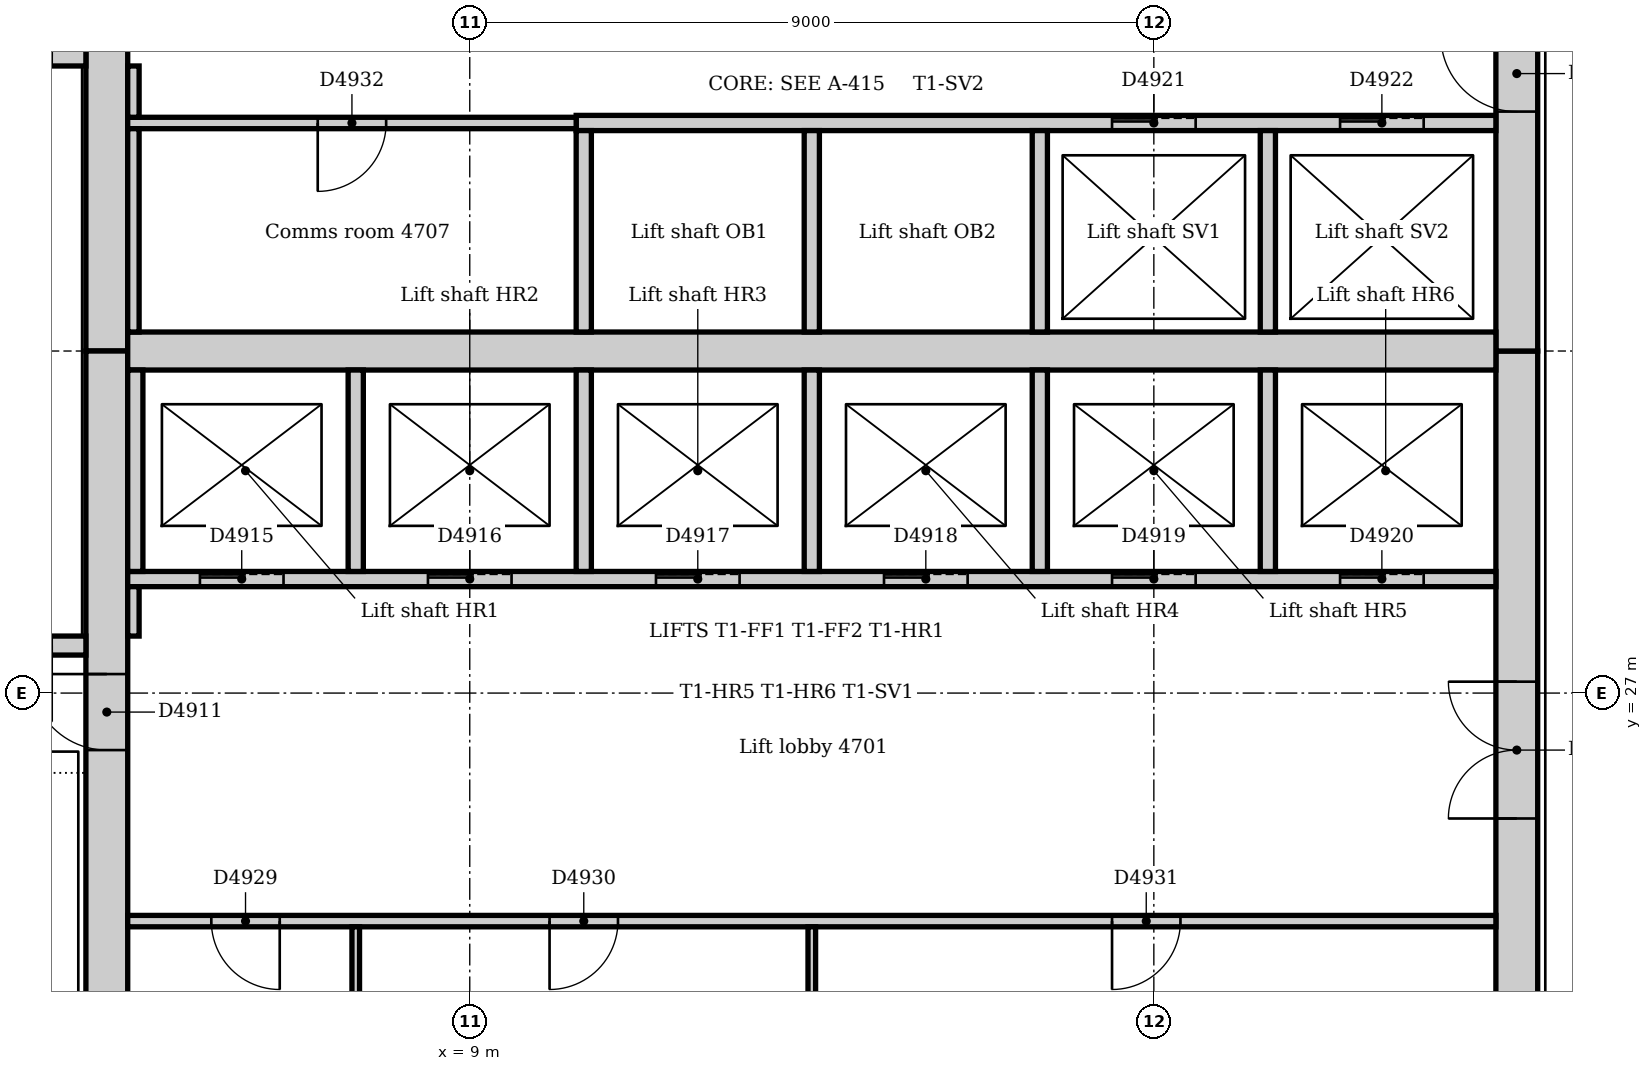
"""IFC4 building model, lengths in metres.
Left out: names, types, materials, properties, quantities, classifications, styles, units other than length and angle.
Written with IfcOpenShell. Run it as: python <this file> out.ifc"""

import sys

from ifc_helpers import new_model, si_unit, direction, frame, frame_2d, origin, place, context, subcontext, project, spatial, rectangle, extrude, element, fill, save


model = new_model("IFC4")
c1 = context("Model", 3, precision=1e-05, world=origin(), true_north=direction((0.0, 1.0)))
c2 = subcontext(c1, "Body", "Model", "MODEL_VIEW")
j1 = project(units=[si_unit("LENGTHUNIT", "METRE"), si_unit("PLANEANGLEUNIT", "RADIAN")], contexts=[c1])
p1 = place(None, origin())
s1 = spatial("IfcSite", under=j1, at=p1, CompositionType="ELEMENT")
p2 = place(p1, origin())
s2 = spatial("IfcBuilding", under=s1, at=p2, CompositionType="ELEMENT")
p3 = place(p2, frame((0.0, 0.0, 198.0)))
s3 = spatial("IfcBuildingStorey", under=s2, at=p3, CompositionType="ELEMENT", Elevation=198.0)
p4 = place(p3, frame((22.775, 21.0, 0.0), z_axis=(0.0, 0.0, 1.0), x_axis=(0.0, 1.0, 0.0)))
e1 = element("IfcWall", 1, at=p4, inside=s3, PredefinedType="SOLIDWALL", context=c2, shape_type="SweptSolid", body=[
    extrude(rectangle(XDim=10.5, YDim=0.55, at=frame_2d((5.25, 0.0))), origin(), (0.0, 0.0, 1.0), 4.0),
])
p5 = place(p4, frame((4.35, 0.0, 0.0)))
e2 = element("IfcOpeningElement", 2, at=p5, cuts=e1, PredefinedType="OPENING", context=c2, shape_type="SweptSolid", body=[
    extrude(rectangle(XDim=1.8, YDim=2.1, at=frame_2d((0.9, 1.05))), frame((0.0, 0.285, 0.0), z_axis=(0.0, -1.0, 0.0), x_axis=(1.0, 0.0, 0.0)), (0.0, 0.0, 1.0), 0.57),
])
p6 = place(p3, frame((22.775, 31.5, 0.0), z_axis=(0.0, 0.0, 1.0), x_axis=(0.0, 1.0, 0.0)))
e3 = element("IfcWall", 3, at=p6, inside=s3, PredefinedType="SOLIDWALL", context=c2, shape_type="SweptSolid", body=[
    extrude(rectangle(XDim=10.5, YDim=0.55, at=frame_2d((5.25, 0.0))), origin(), (0.0, 0.0, 1.0), 4.0),
])
p7 = place(p6, frame((3.15, 0.0, 0.0)))
e4 = element("IfcOpeningElement", 4, at=p7, cuts=e3, PredefinedType="OPENING", context=c2, shape_type="SweptSolid", body=[
    extrude(rectangle(XDim=1.0, YDim=2.1, at=frame_2d((0.5, 1.05))), frame((0.0, 0.285, 0.0), z_axis=(0.0, -1.0, 0.0), x_axis=(1.0, 0.0, 0.0)), (0.0, 0.0, 1.0), 0.57),
])
p8 = place(p6, frame((5.2, 0.0, 0.0)))
e5 = element("IfcOpeningElement", 5, at=p8, cuts=e3, PredefinedType="OPENING", context=c2, shape_type="SweptSolid", body=[
    extrude(rectangle(XDim=1.0, YDim=2.1, at=frame_2d((0.5, 1.05))), frame((0.0, 0.285, 0.0), z_axis=(0.0, -1.0, 0.0), x_axis=(1.0, 0.0, 0.0)), (0.0, 0.0, 1.0), 0.57),
])
p9 = place(p3, frame((4.225, 42.0, 0.0), z_axis=(0.0, 0.0, 1.0), x_axis=(0.0, -1.0, 0.0)))
e6 = element("IfcWall", 6, at=p9, inside=s3, PredefinedType="SOLIDWALL", context=c2, shape_type="SweptSolid", body=[
    extrude(rectangle(XDim=10.5, YDim=0.55, at=frame_2d((5.25, 0.0))), origin(), (0.0, 0.0, 1.0), 4.0),
])
p10 = place(p9, frame((5.3, 0.0, 0.0)))
e7 = element("IfcOpeningElement", 7, at=p10, cuts=e6, PredefinedType="OPENING", context=c2, shape_type="SweptSolid", body=[
    extrude(rectangle(XDim=1.0, YDim=2.1, at=frame_2d((0.5, 1.05))), frame((0.0, 0.285, 0.0), z_axis=(0.0, -1.0, 0.0), x_axis=(1.0, 0.0, 0.0)), (0.0, 0.0, 1.0), 0.57),
])
p11 = place(p3, frame((4.225, 31.5, 0.0), z_axis=(0.0, 0.0, 1.0), x_axis=(0.0, -1.0, 0.0)))
e8 = element("IfcWall", 8, at=p11, inside=s3, PredefinedType="SOLIDWALL", context=c2, shape_type="SweptSolid", body=[
    extrude(rectangle(XDim=10.5, YDim=0.55, at=frame_2d((5.25, 0.0))), origin(), (0.0, 0.0, 1.0), 4.0),
])
p12 = place(p11, frame((4.25, 0.0, 0.0)))
e9 = element("IfcOpeningElement", 9, at=p12, cuts=e8, PredefinedType="OPENING", context=c2, shape_type="SweptSolid", body=[
    extrude(rectangle(XDim=1.0, YDim=2.1, at=frame_2d((0.5, 1.05))), frame((0.0, 0.285, 0.0), z_axis=(0.0, -1.0, 0.0), x_axis=(1.0, 0.0, 0.0)), (0.0, 0.0, 1.0), 0.57),
])
p13 = place(p3, frame((4.5, 31.5, 0.0), z_axis=(0.0, 0.0, 1.0), x_axis=(1.0, 0.0, 0.0)))
e10 = element("IfcWall", 10, at=p13, inside=s3, PredefinedType="SOLIDWALL", context=c2, shape_type="SweptSolid", body=[
    extrude(rectangle(XDim=18.0, YDim=0.5, at=frame_2d((9.0, 0.0))), origin(), (0.0, 0.0, 1.0), 4.0),
])
p14 = place(p3, frame((3.95, 27.625, 0.0), z_axis=(0.0, 0.0, 1.0), x_axis=(-1.0, 0.0, 0.0)))
e11 = element("IfcWall", 11, at=p14, inside=s3, PredefinedType="SOLIDWALL", context=c2, shape_type="SweptSolid", body=[
    extrude(rectangle(XDim=3.59, YDim=0.25, at=frame_2d((1.795, 0.0))), origin(), (0.0, 0.0, 1.0), 4.0),
])
p15 = place(p14, frame((0.45, 0.0, 0.0)))
e12 = element("IfcOpeningElement", 12, at=p15, cuts=e11, PredefinedType="OPENING", context=c2, shape_type="SweptSolid", body=[
    extrude(rectangle(XDim=1.0, YDim=2.1, at=frame_2d((0.5, 1.05))), frame((0.0, 0.135, 0.0), z_axis=(0.0, -1.0, 0.0), x_axis=(1.0, 0.0, 0.0)), (0.0, 0.0, 1.0), 0.27),
])
p16 = place(p3, frame((0.36, 35.375, 0.0), z_axis=(0.0, 0.0, 1.0), x_axis=(1.0, 0.0, 0.0)))
e13 = element("IfcWall", 13, at=p16, inside=s3, PredefinedType="SOLIDWALL", context=c2, shape_type="SweptSolid", body=[
    extrude(rectangle(XDim=3.59, YDim=0.25, at=frame_2d((1.795, 0.0))), origin(), (0.0, 0.0, 1.0), 4.0),
])
p17 = place(p16, frame((2.14, 0.0, 0.0)))
e14 = element("IfcOpeningElement", 14, at=p17, cuts=e13, PredefinedType="OPENING", context=c2, shape_type="SweptSolid", body=[
    extrude(rectangle(XDim=1.0, YDim=2.1, at=frame_2d((0.5, 1.05))), frame((0.0, 0.135, 0.0), z_axis=(0.0, -1.0, 0.0), x_axis=(1.0, 0.0, 0.0)), (0.0, 0.0, 1.0), 0.27),
])
p18 = place(p3, frame((4.5, 28.5, 0.0), z_axis=(0.0, 0.0, 1.0), x_axis=(1.0, 0.0, 0.0)))
e15 = element("IfcWall", 15, at=p18, inside=s3, PredefinedType="PARTITIONING", context=c2, shape_type="SweptSolid", body=[
    extrude(rectangle(XDim=18.0, YDim=0.2, at=frame_2d((9.0, 0.0))), origin(), (0.0, 0.0, 1.0), 3.85),
])
p19 = place(p18, frame((0.95, 0.0, 0.0)))
e16 = element("IfcOpeningElement", 16, at=p19, cuts=e15, PredefinedType="OPENING", context=c2, shape_type="SweptSolid", body=[
    extrude(rectangle(XDim=1.1, YDim=2.1, at=frame_2d((0.55, 1.05))), frame((0.0, 0.11, 0.0), z_axis=(0.0, -1.0, 0.0), x_axis=(1.0, 0.0, 0.0)), (0.0, 0.0, 1.0), 0.22),
])
p20 = place(p18, frame((3.95, 0.0, 0.0)))
e17 = element("IfcOpeningElement", 17, at=p20, cuts=e15, PredefinedType="OPENING", context=c2, shape_type="SweptSolid", body=[
    extrude(rectangle(XDim=1.1, YDim=2.1, at=frame_2d((0.55, 1.05))), frame((0.0, 0.11, 0.0), z_axis=(0.0, -1.0, 0.0), x_axis=(1.0, 0.0, 0.0)), (0.0, 0.0, 1.0), 0.22),
])
p21 = place(p18, frame((6.95, 0.0, 0.0)))
e18 = element("IfcOpeningElement", 18, at=p21, cuts=e15, PredefinedType="OPENING", context=c2, shape_type="SweptSolid", body=[
    extrude(rectangle(XDim=1.1, YDim=2.1, at=frame_2d((0.55, 1.05))), frame((0.0, 0.11, 0.0), z_axis=(0.0, -1.0, 0.0), x_axis=(1.0, 0.0, 0.0)), (0.0, 0.0, 1.0), 0.22),
])
p22 = place(p18, frame((9.95, 0.0, 0.0)))
e19 = element("IfcOpeningElement", 19, at=p22, cuts=e15, PredefinedType="OPENING", context=c2, shape_type="SweptSolid", body=[
    extrude(rectangle(XDim=1.1, YDim=2.1, at=frame_2d((0.55, 1.05))), frame((0.0, 0.11, 0.0), z_axis=(0.0, -1.0, 0.0), x_axis=(1.0, 0.0, 0.0)), (0.0, 0.0, 1.0), 0.22),
])
p23 = place(p18, frame((12.95, 0.0, 0.0)))
e20 = element("IfcOpeningElement", 20, at=p23, cuts=e15, PredefinedType="OPENING", context=c2, shape_type="SweptSolid", body=[
    extrude(rectangle(XDim=1.1, YDim=2.1, at=frame_2d((0.55, 1.05))), frame((0.0, 0.11, 0.0), z_axis=(0.0, -1.0, 0.0), x_axis=(1.0, 0.0, 0.0)), (0.0, 0.0, 1.0), 0.22),
])
p24 = place(p18, frame((15.95, 0.0, 0.0)))
e21 = element("IfcOpeningElement", 21, at=p24, cuts=e15, PredefinedType="OPENING", context=c2, shape_type="SweptSolid", body=[
    extrude(rectangle(XDim=1.1, YDim=2.1, at=frame_2d((0.55, 1.05))), frame((0.0, 0.11, 0.0), z_axis=(0.0, -1.0, 0.0), x_axis=(1.0, 0.0, 0.0)), (0.0, 0.0, 1.0), 0.22),
])
p25 = place(p3, frame((10.4, 34.5, 0.0), z_axis=(0.0, 0.0, 1.0), x_axis=(1.0, 0.0, 0.0)))
e22 = element("IfcWall", 22, at=p25, inside=s3, PredefinedType="PARTITIONING", context=c2, shape_type="SweptSolid", body=[
    extrude(rectangle(XDim=12.1, YDim=0.2, at=frame_2d((6.05, 0.0))), origin(), (0.0, 0.0, 1.0), 3.85),
])
p26 = place(p25, frame((7.05, 0.0, 0.0)))
e23 = element("IfcOpeningElement", 23, at=p26, cuts=e22, PredefinedType="OPENING", context=c2, shape_type="SweptSolid", body=[
    extrude(rectangle(XDim=1.1, YDim=2.1, at=frame_2d((0.55, 1.05))), frame((0.0, 0.11, 0.0), z_axis=(0.0, -1.0, 0.0), x_axis=(1.0, 0.0, 0.0)), (0.0, 0.0, 1.0), 0.22),
])
p27 = place(p25, frame((10.05, 0.0, 0.0)))
e24 = element("IfcOpeningElement", 24, at=p27, cuts=e22, PredefinedType="OPENING", context=c2, shape_type="SweptSolid", body=[
    extrude(rectangle(XDim=1.1, YDim=2.1, at=frame_2d((0.55, 1.05))), frame((0.0, 0.11, 0.0), z_axis=(0.0, -1.0, 0.0), x_axis=(1.0, 0.0, 0.0)), (0.0, 0.0, 1.0), 0.22),
])
for number, where, z_axis, x_axis in (
    (25, (10.5, 28.6, 0.0), (0.0, 0.0, 1.0), (0.0, 1.0, 0.0)),
    (26, (10.5, 31.75, 0.0), (0.0, 0.0, 1.0), (0.0, 1.0, 0.0)),
    (27, (13.5, 28.6, 0.0), (0.0, 0.0, 1.0), (0.0, 1.0, 0.0)),
    (28, (13.5, 31.75, 0.0), (0.0, 0.0, 1.0), (0.0, 1.0, 0.0)),
    (29, (16.5, 28.6, 0.0), (0.0, 0.0, 1.0), (0.0, 1.0, 0.0)),
    (30, (16.5, 31.75, 0.0), (0.0, 0.0, 1.0), (0.0, 1.0, 0.0)),
    (31, (19.5, 28.6, 0.0), (0.0, 0.0, 1.0), (0.0, 1.0, 0.0)),
    (32, (19.5, 31.75, 0.0), (0.0, 0.0, 1.0), (0.0, 1.0, 0.0)),
    (33, (4.6, 28.6, 0.0), (0.0, 0.0, 1.0), (0.0, 1.0, 0.0)),
    (34, (7.5, 28.6, 0.0), (0.0, 0.0, 1.0), (0.0, 1.0, 0.0)),
):
    element("IfcWall", number, at=place(p3, frame(where, z_axis=z_axis, x_axis=x_axis)), inside=s3, PredefinedType="PARTITIONING", context=c2, shape_type="SweptSolid", body=[
        extrude(rectangle(XDim=2.65, YDim=0.2, at=frame_2d((1.325, 0.0))), origin(), (0.0, 0.0, 1.0), 3.85),
    ])
p28 = place(p3, frame((4.5, 24.0, 0.0), z_axis=(0.0, 0.0, 1.0), x_axis=(1.0, 0.0, 0.0)))
e35 = element("IfcWall", 35, at=p28, inside=s3, PredefinedType="PARTITIONING", context=c2, shape_type="SweptSolid", body=[
    extrude(rectangle(XDim=18.0, YDim=0.15, at=frame_2d((9.0, 0.0))), origin(), (0.0, 0.0, 1.0), 3.85),
])
p29 = place(p28, frame((1.1, 0.0, 0.0)))
e36 = element("IfcOpeningElement", 36, at=p29, cuts=e35, PredefinedType="OPENING", context=c2, shape_type="SweptSolid", body=[
    extrude(rectangle(XDim=0.9, YDim=2.1, at=frame_2d((0.45, 1.05))), frame((0.0, 0.085, 0.0), z_axis=(0.0, -1.0, 0.0), x_axis=(1.0, 0.0, 0.0)), (0.0, 0.0, 1.0), 0.17),
])
p30 = place(p28, frame((5.55, 0.0, 0.0)))
e37 = element("IfcOpeningElement", 37, at=p30, cuts=e35, PredefinedType="OPENING", context=c2, shape_type="SweptSolid", body=[
    extrude(rectangle(XDim=0.9, YDim=2.1, at=frame_2d((0.45, 1.05))), frame((0.0, 0.085, 0.0), z_axis=(0.0, -1.0, 0.0), x_axis=(1.0, 0.0, 0.0)), (0.0, 0.0, 1.0), 0.17),
])
p31 = place(p28, frame((12.95, 0.0, 0.0)))
e38 = element("IfcOpeningElement", 38, at=p31, cuts=e35, PredefinedType="OPENING", context=c2, shape_type="SweptSolid", body=[
    extrude(rectangle(XDim=0.9, YDim=2.1, at=frame_2d((0.45, 1.05))), frame((0.0, 0.085, 0.0), z_axis=(0.0, -1.0, 0.0), x_axis=(1.0, 0.0, 0.0)), (0.0, 0.0, 1.0), 0.17),
])
p32 = place(p3, frame((4.5, 34.5, 0.0), z_axis=(0.0, 0.0, 1.0), x_axis=(1.0, 0.0, 0.0)))
e39 = element("IfcWall", 39, at=p32, inside=s3, PredefinedType="PARTITIONING", context=c2, shape_type="SweptSolid", body=[
    extrude(rectangle(XDim=5.9, YDim=0.15, at=frame_2d((2.95, 0.0))), origin(), (0.0, 0.0, 1.0), 3.85),
])
p33 = place(p32, frame((2.5, 0.0, 0.0)))
e40 = element("IfcOpeningElement", 40, at=p33, cuts=e39, PredefinedType="OPENING", context=c2, shape_type="SweptSolid", body=[
    extrude(rectangle(XDim=0.9, YDim=2.1, at=frame_2d((0.45, 1.05))), frame((0.0, 0.085, 0.0), z_axis=(0.0, -1.0, 0.0), x_axis=(1.0, 0.0, 0.0)), (0.0, 0.0, 1.0), 0.17),
])
p34 = place(p3, frame((4.575, 34.575, 0.0), z_axis=(0.0, 0.0, 1.0), x_axis=(0.0, 1.0, 0.0)))
e41 = element("IfcWall", 41, at=p34, inside=s3, PredefinedType="PARTITIONING", context=c2, shape_type="SweptSolid", body=[
    extrude(rectangle(XDim=0.675, YDim=0.15, at=frame_2d((0.338, 0.0))), origin(), (0.0, 0.0, 1.0), 3.85),
])
p35 = place(p3, frame((4.575, 31.75, 0.0), z_axis=(0.0, 0.0, 1.0), x_axis=(0.0, 1.0, 0.0)))
e42 = element("IfcWall", 42, at=p35, inside=s3, PredefinedType="PARTITIONING", context=c2, shape_type="SweptSolid", body=[
    extrude(rectangle(XDim=2.675, YDim=0.15, at=frame_2d((1.337, 0.0))), origin(), (0.0, 0.0, 1.0), 3.85),
])
p36 = place(p3, frame((4.575, 27.75, 0.0), z_axis=(0.0, 0.0, 1.0), x_axis=(0.0, 1.0, 0.0)))
e43 = element("IfcWall", 43, at=p36, inside=s3, PredefinedType="PARTITIONING", context=c2, shape_type="SweptSolid", body=[
    extrude(rectangle(XDim=0.65, YDim=0.15, at=frame_2d((0.325, 0.0))), origin(), (0.0, 0.0, 1.0), 3.85),
])
for number, where, z_axis, x_axis in (
    (44, (7.5, 21.0, 0.0), (0.0, 0.0, 1.0), (0.0, 1.0, 0.0)),
    (45, (13.5, 21.0, 0.0), (0.0, 0.0, 1.0), (0.0, 1.0, 0.0)),
):
    element("IfcWall", number, at=place(p3, frame(where, z_axis=z_axis, x_axis=x_axis)), inside=s3, PredefinedType="PARTITIONING", context=c2, shape_type="SweptSolid", body=[
        extrude(rectangle(XDim=2.925, YDim=0.1, at=frame_2d((1.462, 0.0))), origin(), (0.0, 0.0, 1.0), 3.85),
    ])
p37 = place(p12, frame((1.0, 0.0, 0.0), z_axis=(0.0, 0.0, 1.0), x_axis=(-1.0, 0.0, 0.0)))
e46 = element("IfcDoor", 46, at=p37, inside=s3, OperationType="SINGLE_SWING_RIGHT", PredefinedType="DOOR", context=c2, shape_type="SweptSolid", body=[
    extrude(rectangle(XDim=1.0, YDim=2.1, at=frame_2d((0.5, 1.05))), frame((0.0, 0.025, 0.0), z_axis=(0.0, -1.0, 0.0), x_axis=(1.0, 0.0, 0.0)), (0.0, 0.0, 1.0), 0.05),
])
fill(e9, e46)
p38 = place(p19, origin())
e47 = element("IfcDoor", 47, at=p38, inside=s3, OperationType="SLIDING_TO_LEFT", PredefinedType="DOOR", context=c2, shape_type="SweptSolid", body=[
    extrude(rectangle(XDim=1.1, YDim=2.1, at=frame_2d((0.55, 1.05))), frame((0.0, 0.025, 0.0), z_axis=(0.0, -1.0, 0.0), x_axis=(1.0, 0.0, 0.0)), (0.0, 0.0, 1.0), 0.05),
])
fill(e16, e47)
p39 = place(p20, origin())
e48 = element("IfcDoor", 48, at=p39, inside=s3, OperationType="SLIDING_TO_LEFT", PredefinedType="DOOR", context=c2, shape_type="SweptSolid", body=[
    extrude(rectangle(XDim=1.1, YDim=2.1, at=frame_2d((0.55, 1.05))), frame((0.0, 0.025, 0.0), z_axis=(0.0, -1.0, 0.0), x_axis=(1.0, 0.0, 0.0)), (0.0, 0.0, 1.0), 0.05),
])
fill(e17, e48)
p40 = place(p21, origin())
e49 = element("IfcDoor", 49, at=p40, inside=s3, OperationType="SLIDING_TO_LEFT", PredefinedType="DOOR", context=c2, shape_type="SweptSolid", body=[
    extrude(rectangle(XDim=1.1, YDim=2.1, at=frame_2d((0.55, 1.05))), frame((0.0, 0.025, 0.0), z_axis=(0.0, -1.0, 0.0), x_axis=(1.0, 0.0, 0.0)), (0.0, 0.0, 1.0), 0.05),
])
fill(e18, e49)
p41 = place(p22, origin())
e50 = element("IfcDoor", 50, at=p41, inside=s3, OperationType="SLIDING_TO_LEFT", PredefinedType="DOOR", context=c2, shape_type="SweptSolid", body=[
    extrude(rectangle(XDim=1.1, YDim=2.1, at=frame_2d((0.55, 1.05))), frame((0.0, 0.025, 0.0), z_axis=(0.0, -1.0, 0.0), x_axis=(1.0, 0.0, 0.0)), (0.0, 0.0, 1.0), 0.05),
])
fill(e19, e50)
p42 = place(p23, origin())
e51 = element("IfcDoor", 51, at=p42, inside=s3, OperationType="SLIDING_TO_LEFT", PredefinedType="DOOR", context=c2, shape_type="SweptSolid", body=[
    extrude(rectangle(XDim=1.1, YDim=2.1, at=frame_2d((0.55, 1.05))), frame((0.0, 0.025, 0.0), z_axis=(0.0, -1.0, 0.0), x_axis=(1.0, 0.0, 0.0)), (0.0, 0.0, 1.0), 0.05),
])
fill(e20, e51)
p43 = place(p24, origin())
e52 = element("IfcDoor", 52, at=p43, inside=s3, OperationType="SLIDING_TO_LEFT", PredefinedType="DOOR", context=c2, shape_type="SweptSolid", body=[
    extrude(rectangle(XDim=1.1, YDim=2.1, at=frame_2d((0.55, 1.05))), frame((0.0, 0.025, 0.0), z_axis=(0.0, -1.0, 0.0), x_axis=(1.0, 0.0, 0.0)), (0.0, 0.0, 1.0), 0.05),
])
fill(e21, e52)
p44 = place(p26, origin())
e53 = element("IfcDoor", 53, at=p44, inside=s3, OperationType="SLIDING_TO_LEFT", PredefinedType="DOOR", context=c2, shape_type="SweptSolid", body=[
    extrude(rectangle(XDim=1.1, YDim=2.1, at=frame_2d((0.55, 1.05))), frame((0.0, 0.025, 0.0), z_axis=(0.0, -1.0, 0.0), x_axis=(1.0, 0.0, 0.0)), (0.0, 0.0, 1.0), 0.05),
])
fill(e23, e53)
p45 = place(p27, origin())
e54 = element("IfcDoor", 54, at=p45, inside=s3, OperationType="SLIDING_TO_LEFT", PredefinedType="DOOR", context=c2, shape_type="SweptSolid", body=[
    extrude(rectangle(XDim=1.1, YDim=2.1, at=frame_2d((0.55, 1.05))), frame((0.0, 0.025, 0.0), z_axis=(0.0, -1.0, 0.0), x_axis=(1.0, 0.0, 0.0)), (0.0, 0.0, 1.0), 0.05),
])
fill(e24, e54)
p46 = place(p5, origin())
e55 = element("IfcDoor", 55, at=p46, inside=s3, OperationType="DOUBLE_DOOR_DOUBLE_SWING", PredefinedType="DOOR", context=c2, shape_type="SweptSolid", body=[
    extrude(rectangle(XDim=1.8, YDim=2.1, at=frame_2d((0.9, 1.05))), frame((0.0, 0.025, 0.0), z_axis=(0.0, -1.0, 0.0), x_axis=(1.0, 0.0, 0.0)), (0.0, 0.0, 1.0), 0.05),
])
fill(e2, e55)
p47 = place(p7, origin())
e56 = element("IfcDoor", 56, at=p47, inside=s3, OperationType="SINGLE_SWING_RIGHT", PredefinedType="DOOR", context=c2, shape_type="SweptSolid", body=[
    extrude(rectangle(XDim=1.0, YDim=2.1, at=frame_2d((0.5, 1.05))), frame((0.0, 0.025, 0.0), z_axis=(0.0, -1.0, 0.0), x_axis=(1.0, 0.0, 0.0)), (0.0, 0.0, 1.0), 0.05),
])
fill(e4, e56)
p48 = place(p29, frame((0.9, 0.0, 0.0), z_axis=(0.0, 0.0, 1.0), x_axis=(-1.0, 0.0, 0.0)))
e57 = element("IfcDoor", 57, at=p48, inside=s3, OperationType="SINGLE_SWING_LEFT", PredefinedType="DOOR", context=c2, shape_type="SweptSolid", body=[
    extrude(rectangle(XDim=0.9, YDim=2.1, at=frame_2d((0.45, 1.05))), frame((0.0, 0.025, 0.0), z_axis=(0.0, -1.0, 0.0), x_axis=(1.0, 0.0, 0.0)), (0.0, 0.0, 1.0), 0.05),
])
fill(e36, e57)
p49 = place(p30, frame((0.9, 0.0, 0.0), z_axis=(0.0, 0.0, 1.0), x_axis=(-1.0, 0.0, 0.0)))
e58 = element("IfcDoor", 58, at=p49, inside=s3, OperationType="SINGLE_SWING_RIGHT", PredefinedType="DOOR", context=c2, shape_type="SweptSolid", body=[
    extrude(rectangle(XDim=0.9, YDim=2.1, at=frame_2d((0.45, 1.05))), frame((0.0, 0.025, 0.0), z_axis=(0.0, -1.0, 0.0), x_axis=(1.0, 0.0, 0.0)), (0.0, 0.0, 1.0), 0.05),
])
fill(e37, e58)
p50 = place(p31, frame((0.9, 0.0, 0.0), z_axis=(0.0, 0.0, 1.0), x_axis=(-1.0, 0.0, 0.0)))
e59 = element("IfcDoor", 59, at=p50, inside=s3, OperationType="SINGLE_SWING_RIGHT", PredefinedType="DOOR", context=c2, shape_type="SweptSolid", body=[
    extrude(rectangle(XDim=0.9, YDim=2.1, at=frame_2d((0.45, 1.05))), frame((0.0, 0.025, 0.0), z_axis=(0.0, -1.0, 0.0), x_axis=(1.0, 0.0, 0.0)), (0.0, 0.0, 1.0), 0.05),
])
fill(e38, e59)
p51 = place(p33, frame((0.9, 0.0, 0.0), z_axis=(0.0, 0.0, 1.0), x_axis=(-1.0, 0.0, 0.0)))
e60 = element("IfcDoor", 60, at=p51, inside=s3, OperationType="SINGLE_SWING_RIGHT", PredefinedType="DOOR", context=c2, shape_type="SweptSolid", body=[
    extrude(rectangle(XDim=0.9, YDim=2.1, at=frame_2d((0.45, 1.05))), frame((0.0, 0.025, 0.0), z_axis=(0.0, -1.0, 0.0), x_axis=(1.0, 0.0, 0.0)), (0.0, 0.0, 1.0), 0.05),
])
fill(e40, e60)
save(model, sys.argv[1])
